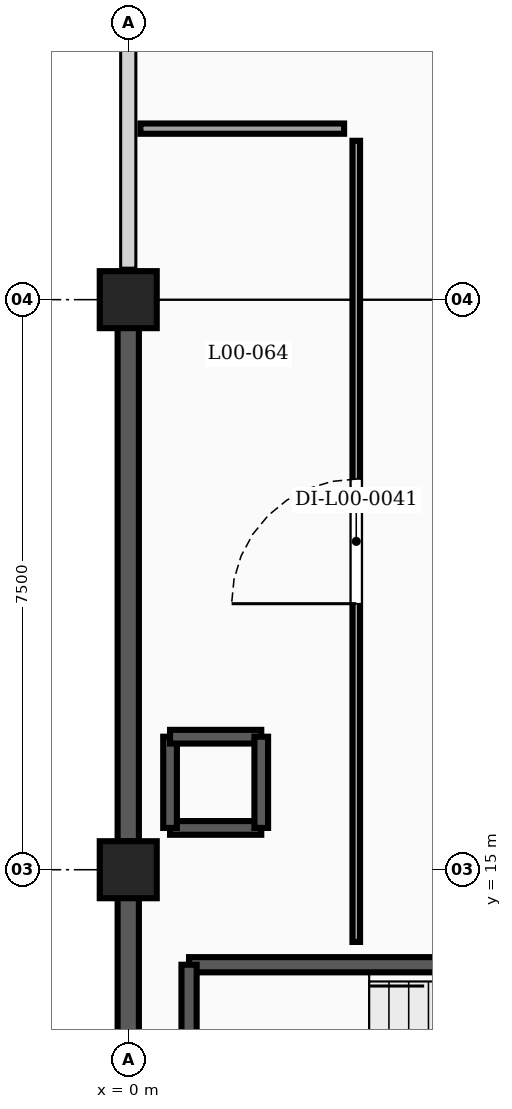
"""IFC4 building model, lengths in metres.
Left out: names, types, materials, properties, quantities, classifications, styles, units other than length and angle.
Written with IfcOpenShell. Run it as: python <this file> out.ifc"""

import sys

from ifc_helpers import new_model, si_unit, direction, frame, frame_2d, origin, origin_2d, place, context, subcontext, project, spatial, rectangle, extrude, element, fill, save


model = new_model("IFC4")
c1 = context("Model", 3, precision=1e-05, world=origin(), true_north=direction((0.0, 1.0)))
c2 = subcontext(c1, "Body", "Model", "MODEL_VIEW")
j1 = project(units=[si_unit("LENGTHUNIT", "METRE"), si_unit("PLANEANGLEUNIT", "RADIAN")], contexts=[c1])
p1 = place(None, origin())
s1 = spatial("IfcSite", under=j1, at=p1, CompositionType="ELEMENT")
p2 = place(p1, origin())
s2 = spatial("IfcBuilding", under=s1, at=p2, CompositionType="ELEMENT")
p3 = place(p2, origin())
s3 = spatial("IfcBuildingStorey", under=s2, at=p3, CompositionType="ELEMENT", Elevation=0.0)
for number, where, z_axis, x_axis in (
    (1, (0.0, 15.0, -0.25), (0.0, 0.0, 1.0), (1.0, 0.0, 0.0)),
    (2, (0.0, 22.5, -0.25), (0.0, 0.0, 1.0), (1.0, 0.0, 0.0)),
):
    element("IfcColumn", number, at=place(p3, frame(where, z_axis=z_axis, x_axis=x_axis)), inside=s3, PredefinedType="COLUMN", context=c2, shape_type="SweptSolid", body=[
        extrude(rectangle(XDim=0.75, YDim=0.75, at=origin_2d()), origin(), (0.0, 0.0, 1.0), 4.75),
    ])
for number, where, z_axis, x_axis in (
    (3, (0.0, 7.871, 0.0), (0.0, 0.0, 1.0), (0.0, 1.0, 0.0)),
    (4, (0.0, 15.371, 0.0), (0.0, 0.0, 1.0), (0.0, 1.0, 0.0)),
):
    element("IfcWall", number, at=place(p3, frame(where, z_axis=z_axis, x_axis=x_axis)), inside=s3, PredefinedType="SOLIDWALL", context=c2, shape_type="SweptSolid", body=[
        extrude(rectangle(XDim=6.758, YDim=0.28, at=frame_2d((3.379, 0.0))), origin(), (0.0, 0.0, 1.0), 3.332),
    ])
for number, where, z_axis, x_axis in (
    (5, (1.75, 15.55, 0.0), (0.0, 0.0, 1.0), (-1.0, 0.0, 0.0)),
    (6, (0.55, 15.55, 0.0), (0.0, 0.0, 1.0), (0.0, 1.0, 0.0)),
    (7, (0.55, 16.75, 0.0), (0.0, 0.0, 1.0), (1.0, 0.0, 0.0)),
    (8, (1.75, 16.75, 0.0), (0.0, 0.0, 1.0), (0.0, -1.0, 0.0)),
):
    element("IfcWall", number, at=place(p3, frame(where, z_axis=z_axis, x_axis=x_axis)), inside=s3, PredefinedType="SHEAR", context=c2, shape_type="SweptSolid", body=[
        extrude(rectangle(XDim=1.2, YDim=0.18, at=frame_2d((0.6, 0.0))), origin(), (0.0, 0.0, 1.0), 4.09),
    ])
p4 = place(p3, frame((8.2, 13.75, 0.0), z_axis=(0.0, 0.0, 1.0), x_axis=(-1.0, 0.0, 0.0)))
e9 = element("IfcWall", 9, at=p4, inside=s3, PredefinedType="SHEAR", context=c2, shape_type="SweptSolid", body=[
    extrude(rectangle(XDim=7.4, YDim=0.2, at=frame_2d((3.7, 0.0))), origin(), (0.0, 0.0, 1.0), 4.09),
])
p5 = place(p3, frame((0.8, 13.75, 0.0), z_axis=(0.0, 0.0, 1.0), x_axis=(0.0, -1.0, 0.0)))
e10 = element("IfcWall", 10, at=p5, inside=s3, PredefinedType="SHEAR", context=c2, shape_type="SweptSolid", body=[
    extrude(rectangle(XDim=5.0, YDim=0.2, at=frame_2d((2.5, 0.0))), origin(), (0.0, 0.0, 1.0), 4.09),
])
p6 = place(p3, frame((3.0, 14.05, 0.0), z_axis=(0.0, 0.0, 1.0), x_axis=(0.0, 1.0, 0.0)))
e11 = element("IfcWall", 11, at=p6, inside=s3, PredefinedType="PARTITIONING", context=c2, shape_type="SweptSolid", body=[
    extrude(rectangle(XDim=10.54, YDim=0.1, at=frame_2d((5.27, 0.0))), origin(), (0.0, 0.0, 1.0), 3.775),
])
p7 = place(p6, frame((4.45, 0.0, 0.0)))
e12 = element("IfcOpeningElement", 12, at=p7, cuts=e11, PredefinedType="OPENING", context=c2, shape_type="SweptSolid", body=[
    extrude(rectangle(XDim=1.64, YDim=2.2, at=frame_2d((0.82, 1.1))), frame((0.0, 0.06, 0.0), z_axis=(0.0, -1.0, 0.0), x_axis=(1.0, 0.0, 0.0)), (0.0, 0.0, 1.0), 0.12),
])
p8 = place(p3, frame((2.84, 24.75, 0.0), z_axis=(0.0, 0.0, 1.0), x_axis=(-1.0, 0.0, 0.0)))
e13 = element("IfcWall", 13, at=p8, inside=s3, PredefinedType="PARTITIONING", context=c2, shape_type="SweptSolid", body=[
    extrude(rectangle(XDim=2.68, YDim=0.135, at=frame_2d((1.34, 0.0))), origin(), (0.0, 0.0, 1.0), 4.09),
])
p9 = place(p7, origin())
e14 = element("IfcDoor", 14, at=p9, inside=s3, OperationType="SINGLE_SWING_LEFT", PredefinedType="DOOR", context=c2, shape_type="SweptSolid", body=[
    extrude(rectangle(XDim=1.64, YDim=2.2, at=frame_2d((0.82, 1.1))), frame((0.0, 0.025, 0.0), z_axis=(0.0, -1.0, 0.0), x_axis=(1.0, 0.0, 0.0)), (0.0, 0.0, 1.0), 0.05),
])
fill(e12, e14)
save(model, sys.argv[1])
